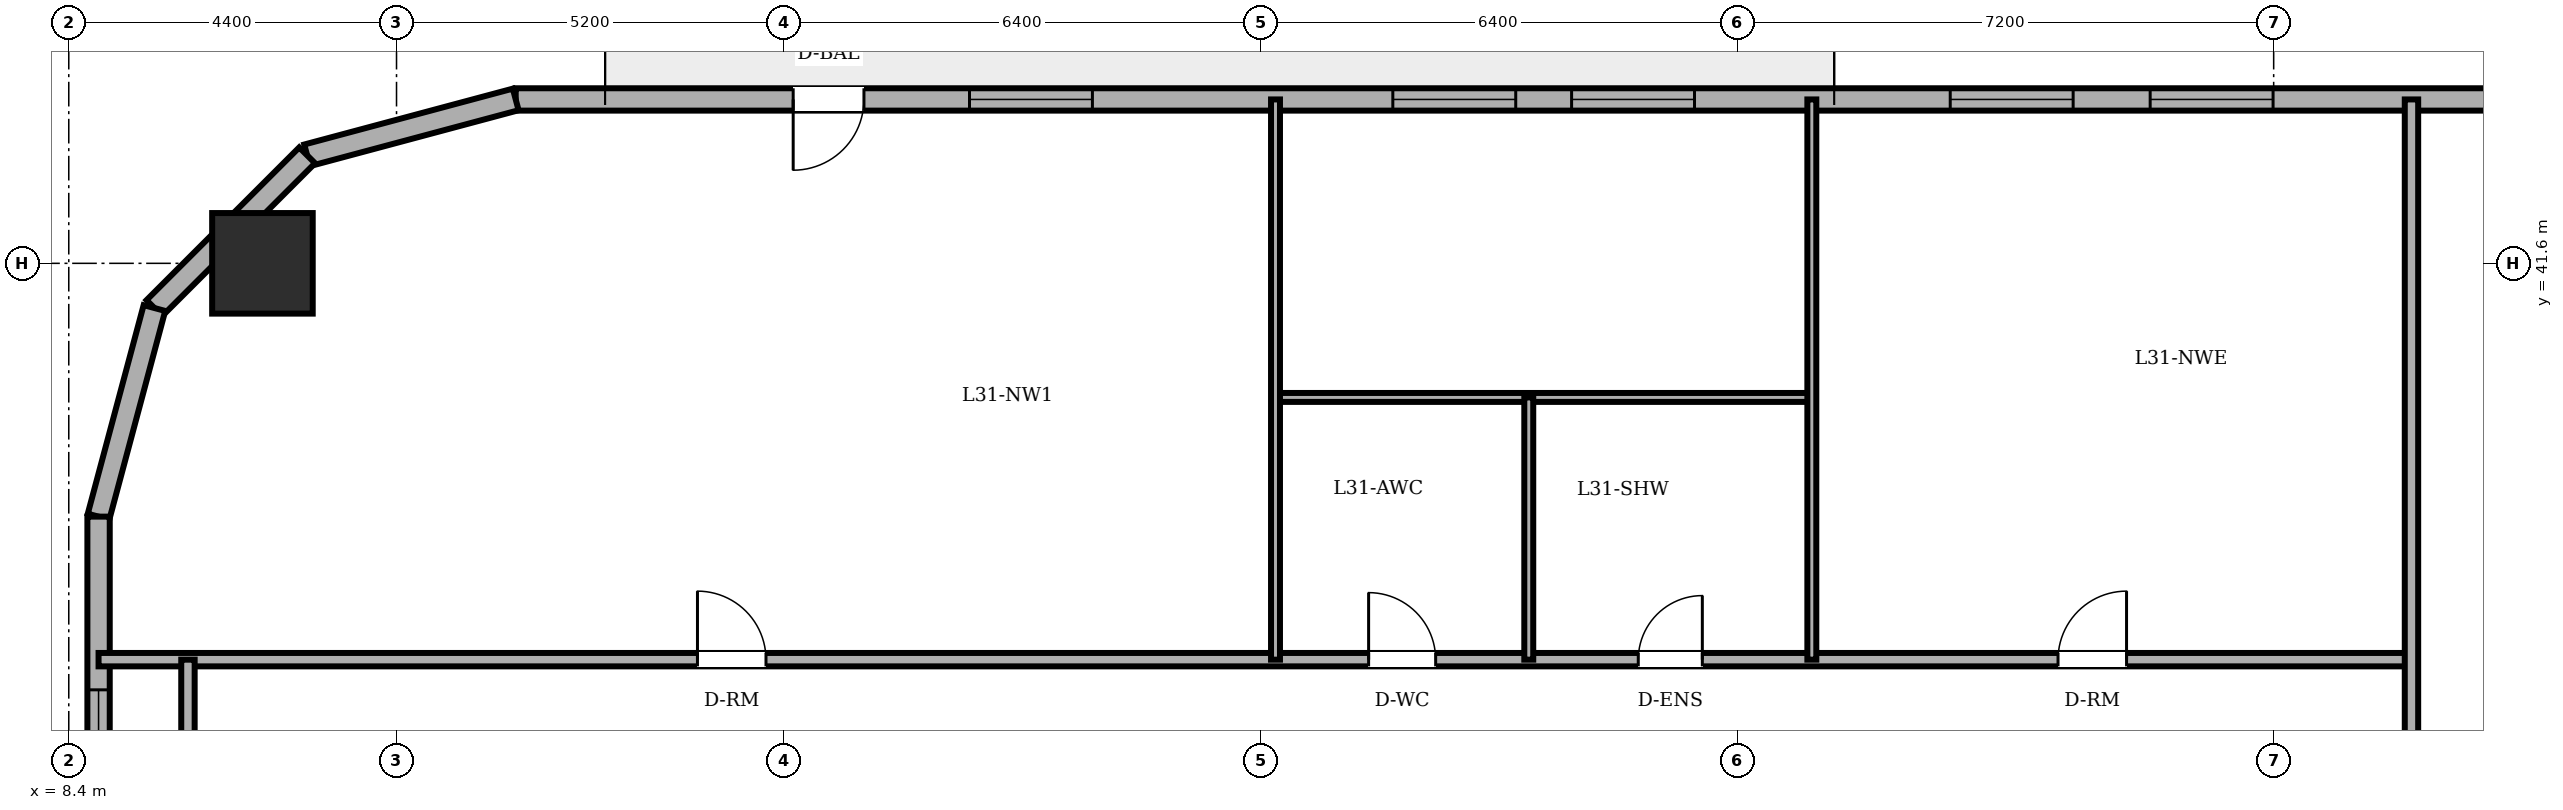
"""IFC4 building model, lengths in metres.
Left out: names, types, materials, properties, quantities, classifications, styles, units other than length and angle.
Written with IfcOpenShell. Run it as: python <this file> out.ifc"""

import sys

from ifc_helpers import new_model, si_unit, direction, frame, frame_2d, origin, origin_2d, place, context, subcontext, project, spatial, rectangle, circle, extrude, element, fill, save


model = new_model("IFC4")
c1 = context("Model", 3, precision=1e-05, world=origin(), true_north=direction((0.0, 1.0)))
c2 = subcontext(c1, "Body", "Model", "MODEL_VIEW")
j1 = project(units=[si_unit("LENGTHUNIT", "METRE"), si_unit("PLANEANGLEUNIT", "RADIAN")], contexts=[c1])
p1 = place(None, origin())
s1 = spatial("IfcSite", under=j1, at=p1, CompositionType="ELEMENT")
p2 = place(p1, origin())
s2 = spatial("IfcBuilding", under=s1, at=p2, CompositionType="ELEMENT")
p3 = place(p2, frame((0.0, 0.0, 118.7)))
s3 = spatial("IfcBuildingStorey", under=s2, at=p3, CompositionType="ELEMENT", Elevation=118.7)
p4 = place(p3, frame((11.0, 41.6, 0.0), z_axis=(0.0, 0.0, 1.0), x_axis=(1.0, 0.0, 0.0)))
e1 = element("IfcColumn", 1, at=p4, inside=s3, PredefinedType="COLUMN", context=c2, shape_type="SweptSolid", body=[
    extrude(circle(Radius=0.675, at=origin_2d()), origin(), (0.0, 0.0, 1.0), 3.6),
])
p5 = place(p3, frame((44.333, 43.8, 0.0), z_axis=(0.0, 0.0, 1.0), x_axis=(-1.0, 0.0, 0.0)))
e2 = element("IfcWall", 2, at=p5, inside=s3, PredefinedType="SOLIDWALL", context=c2, shape_type="SweptSolid", body=[
    extrude(rectangle(XDim=29.933, YDim=0.3, at=frame_2d((14.967, 0.0))), origin(), (0.0, 0.0, 1.0), 3.4),
])
p6 = place(p5, frame((25.258, 0.0, 0.0)))
e3 = element("IfcOpeningElement", 3, at=p6, cuts=e2, PredefinedType="OPENING", context=c2, shape_type="SweptSolid", body=[
    extrude(rectangle(XDim=0.95, YDim=2.2, at=frame_2d((0.475, 1.1))), frame((0.0, 0.16, 0.0), z_axis=(0.0, -1.0, 0.0), x_axis=(1.0, 0.0, 0.0)), (0.0, 0.0, 1.0), 0.32),
])
p7 = place(p5, frame((1.729, 0.0, 0.85)))
e4 = element("IfcOpeningElement", 4, at=p7, cuts=e2, PredefinedType="OPENING", context=c2, shape_type="SweptSolid", body=[
    extrude(rectangle(XDim=1.65, YDim=1.55, at=frame_2d((0.825, 0.775))), frame((0.0, 0.16, 0.0), z_axis=(0.0, -1.0, 0.0), x_axis=(1.0, 0.0, 0.0)), (0.0, 0.0, 1.0), 0.32),
])
p8 = place(p5, frame((6.341, 0.0, 0.85)))
e5 = element("IfcOpeningElement", 5, at=p8, cuts=e2, PredefinedType="OPENING", context=c2, shape_type="SweptSolid", body=[
    extrude(rectangle(XDim=1.65, YDim=1.55, at=frame_2d((0.825, 0.775))), frame((0.0, 0.16, 0.0), z_axis=(0.0, -1.0, 0.0), x_axis=(1.0, 0.0, 0.0)), (0.0, 0.0, 1.0), 0.32),
])
p9 = place(p5, frame((9.025, 0.0, 0.85)))
e6 = element("IfcOpeningElement", 6, at=p9, cuts=e2, PredefinedType="OPENING", context=c2, shape_type="SweptSolid", body=[
    extrude(rectangle(XDim=1.65, YDim=1.55, at=frame_2d((0.825, 0.775))), frame((0.0, 0.16, 0.0), z_axis=(0.0, -1.0, 0.0), x_axis=(1.0, 0.0, 0.0)), (0.0, 0.0, 1.0), 0.32),
])
p10 = place(p5, frame((14.108, 0.0, 0.85)))
e7 = element("IfcOpeningElement", 7, at=p10, cuts=e2, PredefinedType="OPENING", context=c2, shape_type="SweptSolid", body=[
    extrude(rectangle(XDim=1.65, YDim=1.55, at=frame_2d((0.825, 0.775))), frame((0.0, 0.16, 0.0), z_axis=(0.0, -1.0, 0.0), x_axis=(1.0, 0.0, 0.0)), (0.0, 0.0, 1.0), 0.32),
])
p11 = place(p5, frame((16.508, 0.0, 0.85)))
e8 = element("IfcOpeningElement", 8, at=p11, cuts=e2, PredefinedType="OPENING", context=c2, shape_type="SweptSolid", body=[
    extrude(rectangle(XDim=1.65, YDim=1.55, at=frame_2d((0.825, 0.775))), frame((0.0, 0.16, 0.0), z_axis=(0.0, -1.0, 0.0), x_axis=(1.0, 0.0, 0.0)), (0.0, 0.0, 1.0), 0.32),
])
p12 = place(p5, frame((22.191, 0.0, 0.85)))
e9 = element("IfcOpeningElement", 9, at=p12, cuts=e2, PredefinedType="OPENING", context=c2, shape_type="SweptSolid", body=[
    extrude(rectangle(XDim=1.65, YDim=1.55, at=frame_2d((0.825, 0.775))), frame((0.0, 0.16, 0.0), z_axis=(0.0, -1.0, 0.0), x_axis=(1.0, 0.0, 0.0)), (0.0, 0.0, 1.0), 0.32),
])
p13 = place(p3, frame((14.4, 43.8, 0.0), z_axis=(0.0, 0.0, 1.0), x_axis=(-0.965943540406, -0.258752926066, 0.0)))
e10 = element("IfcWall", 10, at=p13, inside=s3, PredefinedType="SOLIDWALL", context=c2, shape_type="SweptSolid", body=[
    extrude(rectangle(XDim=2.898, YDim=0.3, at=frame_2d((1.449, 0.0))), origin(), (0.0, 0.0, 1.0), 3.4),
])
p14 = place(p3, frame((11.6, 43.05, 0.0), z_axis=(0.0, 0.0, 1.0), x_axis=(-0.707106781187, -0.707106781187, 0.0)))
e11 = element("IfcWall", 11, at=p14, inside=s3, PredefinedType="SOLIDWALL", context=c2, shape_type="SweptSolid", body=[
    extrude(rectangle(XDim=2.899, YDim=0.3, at=frame_2d((1.45, 0.0))), origin(), (0.0, 0.0, 1.0), 3.4),
])
p15 = place(p3, frame((9.55, 41.0, 0.0), z_axis=(0.0, 0.0, 1.0), x_axis=(-0.258731875344, -0.96594917914, 0.0)))
e12 = element("IfcWall", 12, at=p15, inside=s3, PredefinedType="SOLIDWALL", context=c2, shape_type="SweptSolid", body=[
    extrude(rectangle(XDim=2.899, YDim=0.3, at=frame_2d((1.449, 0.0))), origin(), (0.0, 0.0, 1.0), 3.4),
])
p16 = place(p3, frame((8.8, 38.2, 0.0), z_axis=(0.0, 0.0, 1.0), x_axis=(0.0, -1.0, 0.0)))
e13 = element("IfcWall", 13, at=p16, inside=s3, PredefinedType="SOLIDWALL", context=c2, shape_type="SweptSolid", body=[
    extrude(rectangle(XDim=28.4, YDim=0.3, at=frame_2d((14.2, 0.0))), origin(), (0.0, 0.0, 1.0), 3.4),
])
p17 = place(p16, frame((2.325, 0.0, 0.85)))
e14 = element("IfcOpeningElement", 14, at=p17, cuts=e13, PredefinedType="OPENING", context=c2, shape_type="SweptSolid", body=[
    extrude(rectangle(XDim=1.65, YDim=1.55, at=frame_2d((0.825, 0.775))), frame((0.0, 0.16, 0.0), z_axis=(0.0, -1.0, 0.0), x_axis=(1.0, 0.0, 0.0)), (0.0, 0.0, 1.0), 0.32),
])
p18 = place(p16, frame((6.828, 0.0, 0.85)))
e15 = element("IfcOpeningElement", 15, at=p18, cuts=e13, PredefinedType="OPENING", context=c2, shape_type="SweptSolid", body=[
    extrude(rectangle(XDim=1.65, YDim=1.55, at=frame_2d((0.825, 0.775))), frame((0.0, 0.16, 0.0), z_axis=(0.0, -1.0, 0.0), x_axis=(1.0, 0.0, 0.0)), (0.0, 0.0, 1.0), 0.32),
])
p19 = place(p16, frame((10.102, 0.0, 0.85)))
e16 = element("IfcOpeningElement", 16, at=p19, cuts=e13, PredefinedType="OPENING", context=c2, shape_type="SweptSolid", body=[
    extrude(rectangle(XDim=1.65, YDim=1.55, at=frame_2d((0.825, 0.775))), frame((0.0, 0.16, 0.0), z_axis=(0.0, -1.0, 0.0), x_axis=(1.0, 0.0, 0.0)), (0.0, 0.0, 1.0), 0.32),
])
p20 = place(p16, frame((16.648, 0.0, 0.85)))
e17 = element("IfcOpeningElement", 17, at=p20, cuts=e13, PredefinedType="OPENING", context=c2, shape_type="SweptSolid", body=[
    extrude(rectangle(XDim=1.65, YDim=1.55, at=frame_2d((0.825, 0.775))), frame((0.0, 0.16, 0.0), z_axis=(0.0, -1.0, 0.0), x_axis=(1.0, 0.0, 0.0)), (0.0, 0.0, 1.0), 0.32),
])
p21 = place(p16, frame((19.922, 0.0, 0.85)))
e18 = element("IfcOpeningElement", 18, at=p21, cuts=e13, PredefinedType="OPENING", context=c2, shape_type="SweptSolid", body=[
    extrude(rectangle(XDim=1.65, YDim=1.55, at=frame_2d((0.825, 0.775))), frame((0.0, 0.16, 0.0), z_axis=(0.0, -1.0, 0.0), x_axis=(1.0, 0.0, 0.0)), (0.0, 0.0, 1.0), 0.32),
])
p22 = place(p16, frame((24.425, 0.0, 0.85)))
e19 = element("IfcOpeningElement", 19, at=p22, cuts=e13, PredefinedType="OPENING", context=c2, shape_type="SweptSolid", body=[
    extrude(rectangle(XDim=1.65, YDim=1.55, at=frame_2d((0.825, 0.775))), frame((0.0, 0.16, 0.0), z_axis=(0.0, -1.0, 0.0), x_axis=(1.0, 0.0, 0.0)), (0.0, 0.0, 1.0), 0.32),
])
p23 = place(p3, frame((8.8, 36.28, 0.0), z_axis=(0.0, 0.0, 1.0), x_axis=(1.0, 0.0, 0.0)))
e20 = element("IfcWall", 20, at=p23, inside=s3, PredefinedType="PARTITIONING", context=c2, shape_type="SweptSolid", body=[
    extrude(rectangle(XDim=31.05, YDim=0.18, at=frame_2d((15.525, 0.0))), origin(), (0.0, 0.0, 1.0), 3.4),
])
p24 = place(p23, frame((17.05, 0.0, 0.0)))
e21 = element("IfcOpeningElement", 21, at=p24, cuts=e20, PredefinedType="OPENING", context=c2, shape_type="SweptSolid", body=[
    extrude(rectangle(XDim=0.9, YDim=2.1, at=frame_2d((0.45, 1.05))), frame((0.0, 0.1, 0.0), z_axis=(0.0, -1.0, 0.0), x_axis=(1.0, 0.0, 0.0)), (0.0, 0.0, 1.0), 0.2),
])
p25 = place(p23, frame((20.67, 0.0, 0.0)))
e22 = element("IfcOpeningElement", 22, at=p25, cuts=e20, PredefinedType="OPENING", context=c2, shape_type="SweptSolid", body=[
    extrude(rectangle(XDim=0.86, YDim=2.1, at=frame_2d((0.43, 1.05))), frame((0.0, 0.1, 0.0), z_axis=(0.0, -1.0, 0.0), x_axis=(1.0, 0.0, 0.0)), (0.0, 0.0, 1.0), 0.2),
])
p26 = place(p23, frame((8.04, 0.0, 0.0)))
e23 = element("IfcOpeningElement", 23, at=p26, cuts=e20, PredefinedType="OPENING", context=c2, shape_type="SweptSolid", body=[
    extrude(rectangle(XDim=0.92, YDim=2.1, at=frame_2d((0.46, 1.05))), frame((0.0, 0.1, 0.0), z_axis=(0.0, -1.0, 0.0), x_axis=(1.0, 0.0, 0.0)), (0.0, 0.0, 1.0), 0.2),
])
p27 = place(p23, frame((26.305, 0.0, 0.0)))
e24 = element("IfcOpeningElement", 24, at=p27, cuts=e20, PredefinedType="OPENING", context=c2, shape_type="SweptSolid", body=[
    extrude(rectangle(XDim=0.92, YDim=2.1, at=frame_2d((0.46, 1.05))), frame((0.0, 0.1, 0.0), z_axis=(0.0, -1.0, 0.0), x_axis=(1.0, 0.0, 0.0)), (0.0, 0.0, 1.0), 0.2),
])
p28 = place(p3, frame((24.6, 39.8, 0.0), z_axis=(0.0, 0.0, 1.0), x_axis=(1.0, 0.0, 0.0)))
e25 = element("IfcWall", 25, at=p28, inside=s3, PredefinedType="PARTITIONING", context=c2, shape_type="SweptSolid", body=[
    extrude(rectangle(XDim=7.2, YDim=0.12, at=frame_2d((3.6, 0.0))), origin(), (0.0, 0.0, 1.0), 3.4),
])
p29 = place(p3, frame((10.0, 33.82, 0.0), z_axis=(0.0, 0.0, 1.0), x_axis=(0.0, 1.0, 0.0)))
e26 = element("IfcWall", 26, at=p29, inside=s3, PredefinedType="PARTITIONING", context=c2, shape_type="SweptSolid", body=[
    extrude(rectangle(XDim=2.46, YDim=0.18, at=frame_2d((1.23, 0.0))), origin(), (0.0, 0.0, 1.0), 3.4),
])
p30 = place(p3, frame((24.6, 36.28, 0.0), z_axis=(0.0, 0.0, 1.0), x_axis=(0.0, 1.0, 0.0)))
e27 = element("IfcWall", 27, at=p30, inside=s3, PredefinedType="PARTITIONING", context=c2, shape_type="SweptSolid", body=[
    extrude(rectangle(XDim=7.52, YDim=0.12, at=frame_2d((3.76, 0.0))), origin(), (0.0, 0.0, 1.0), 3.4),
])
p31 = place(p3, frame((28.0, 36.28, 0.0), z_axis=(0.0, 0.0, 1.0), x_axis=(0.0, 1.0, 0.0)))
e28 = element("IfcWall", 28, at=p31, inside=s3, PredefinedType="PARTITIONING", context=c2, shape_type="SweptSolid", body=[
    extrude(rectangle(XDim=3.52, YDim=0.12, at=frame_2d((1.76, 0.0))), origin(), (0.0, 0.0, 1.0), 3.4),
])
p32 = place(p3, frame((31.8, 36.28, 0.0), z_axis=(0.0, 0.0, 1.0), x_axis=(0.0, 1.0, 0.0)))
e29 = element("IfcWall", 29, at=p32, inside=s3, PredefinedType="PARTITIONING", context=c2, shape_type="SweptSolid", body=[
    extrude(rectangle(XDim=7.52, YDim=0.12, at=frame_2d((3.76, 0.0))), origin(), (0.0, 0.0, 1.0), 3.4),
])
p33 = place(p3, frame((39.85, 25.18, 0.0), z_axis=(0.0, 0.0, 1.0), x_axis=(0.0, 1.0, 0.0)))
e30 = element("IfcWall", 30, at=p33, inside=s3, PredefinedType="PARTITIONING", context=c2, shape_type="SweptSolid", body=[
    extrude(rectangle(XDim=18.62, YDim=0.18, at=frame_2d((9.31, 0.0))), origin(), (0.0, 0.0, 1.0), 3.4),
])
p34 = place(p33, frame((5.35, 0.0, 0.0)))
e31 = element("IfcOpeningElement", 31, at=p34, cuts=e30, PredefinedType="OPENING", context=c2, shape_type="SweptSolid", body=[
    extrude(rectangle(XDim=0.92, YDim=2.1, at=frame_2d((0.46, 1.05))), frame((0.0, 0.1, 0.0), z_axis=(0.0, -1.0, 0.0), x_axis=(1.0, 0.0, 0.0)), (0.0, 0.0, 1.0), 0.2),
])
p35 = place(p6, origin())
e32 = element("IfcDoor", 32, at=p35, inside=s3, OperationType="SINGLE_SWING_RIGHT", PredefinedType="DOOR", context=c2, shape_type="SweptSolid", body=[
    extrude(rectangle(XDim=0.95, YDim=2.2, at=frame_2d((0.475, 1.1))), frame((0.0, 0.025, 0.0), z_axis=(0.0, -1.0, 0.0), x_axis=(1.0, 0.0, 0.0)), (0.0, 0.0, 1.0), 0.05),
])
fill(e3, e32)
p36 = place(p8, origin())
e33 = element("IfcWindow", 33, at=p36, inside=s3, PartitioningType="DOUBLE_PANEL_VERTICAL", PredefinedType="WINDOW", context=c2, shape_type="SweptSolid", body=[
    extrude(rectangle(XDim=1.65, YDim=1.55, at=frame_2d((0.825, 0.775))), frame((0.0, 0.03, 0.0), z_axis=(0.0, -1.0, 0.0), x_axis=(1.0, 0.0, 0.0)), (0.0, 0.0, 1.0), 0.06),
])
fill(e5, e33)
p37 = place(p9, origin())
e34 = element("IfcWindow", 34, at=p37, inside=s3, PartitioningType="DOUBLE_PANEL_VERTICAL", PredefinedType="WINDOW", context=c2, shape_type="SweptSolid", body=[
    extrude(rectangle(XDim=1.65, YDim=1.55, at=frame_2d((0.825, 0.775))), frame((0.0, 0.03, 0.0), z_axis=(0.0, -1.0, 0.0), x_axis=(1.0, 0.0, 0.0)), (0.0, 0.0, 1.0), 0.06),
])
fill(e6, e34)
p38 = place(p10, origin())
e35 = element("IfcWindow", 35, at=p38, inside=s3, PartitioningType="DOUBLE_PANEL_VERTICAL", PredefinedType="WINDOW", context=c2, shape_type="SweptSolid", body=[
    extrude(rectangle(XDim=1.65, YDim=1.55, at=frame_2d((0.825, 0.775))), frame((0.0, 0.03, 0.0), z_axis=(0.0, -1.0, 0.0), x_axis=(1.0, 0.0, 0.0)), (0.0, 0.0, 1.0), 0.06),
])
fill(e7, e35)
p39 = place(p11, origin())
e36 = element("IfcWindow", 36, at=p39, inside=s3, PartitioningType="DOUBLE_PANEL_VERTICAL", PredefinedType="WINDOW", context=c2, shape_type="SweptSolid", body=[
    extrude(rectangle(XDim=1.65, YDim=1.55, at=frame_2d((0.825, 0.775))), frame((0.0, 0.03, 0.0), z_axis=(0.0, -1.0, 0.0), x_axis=(1.0, 0.0, 0.0)), (0.0, 0.0, 1.0), 0.06),
])
fill(e8, e36)
p40 = place(p12, origin())
e37 = element("IfcWindow", 37, at=p40, inside=s3, PartitioningType="DOUBLE_PANEL_VERTICAL", PredefinedType="WINDOW", context=c2, shape_type="SweptSolid", body=[
    extrude(rectangle(XDim=1.65, YDim=1.55, at=frame_2d((0.825, 0.775))), frame((0.0, 0.03, 0.0), z_axis=(0.0, -1.0, 0.0), x_axis=(1.0, 0.0, 0.0)), (0.0, 0.0, 1.0), 0.06),
])
fill(e9, e37)
p41 = place(p17, origin())
e38 = element("IfcWindow", 38, at=p41, inside=s3, PartitioningType="DOUBLE_PANEL_VERTICAL", PredefinedType="WINDOW", context=c2, shape_type="SweptSolid", body=[
    extrude(rectangle(XDim=1.65, YDim=1.55, at=frame_2d((0.825, 0.775))), frame((0.0, 0.03, 0.0), z_axis=(0.0, -1.0, 0.0), x_axis=(1.0, 0.0, 0.0)), (0.0, 0.0, 1.0), 0.06),
])
fill(e14, e38)
p42 = place(p24, origin())
e39 = element("IfcDoor", 39, at=p42, inside=s3, OperationType="SINGLE_SWING_LEFT", PredefinedType="DOOR", context=c2, shape_type="SweptSolid", body=[
    extrude(rectangle(XDim=0.9, YDim=2.1, at=frame_2d((0.45, 1.05))), frame((0.0, 0.025, 0.0), z_axis=(0.0, -1.0, 0.0), x_axis=(1.0, 0.0, 0.0)), (0.0, 0.0, 1.0), 0.05),
])
fill(e21, e39)
p43 = place(p25, origin())
e40 = element("IfcDoor", 40, at=p43, inside=s3, OperationType="SINGLE_SWING_RIGHT", PredefinedType="DOOR", context=c2, shape_type="SweptSolid", body=[
    extrude(rectangle(XDim=0.86, YDim=2.1, at=frame_2d((0.43, 1.05))), frame((0.0, 0.025, 0.0), z_axis=(0.0, -1.0, 0.0), x_axis=(1.0, 0.0, 0.0)), (0.0, 0.0, 1.0), 0.05),
])
fill(e22, e40)
p44 = place(p26, origin())
e41 = element("IfcDoor", 41, at=p44, inside=s3, OperationType="SINGLE_SWING_LEFT", PredefinedType="DOOR", context=c2, shape_type="SweptSolid", body=[
    extrude(rectangle(XDim=0.92, YDim=2.1, at=frame_2d((0.46, 1.05))), frame((0.0, 0.025, 0.0), z_axis=(0.0, -1.0, 0.0), x_axis=(1.0, 0.0, 0.0)), (0.0, 0.0, 1.0), 0.05),
])
fill(e23, e41)
p45 = place(p27, origin())
e42 = element("IfcDoor", 42, at=p45, inside=s3, OperationType="SINGLE_SWING_RIGHT", PredefinedType="DOOR", context=c2, shape_type="SweptSolid", body=[
    extrude(rectangle(XDim=0.92, YDim=2.1, at=frame_2d((0.46, 1.05))), frame((0.0, 0.025, 0.0), z_axis=(0.0, -1.0, 0.0), x_axis=(1.0, 0.0, 0.0)), (0.0, 0.0, 1.0), 0.05),
])
fill(e24, e42)
save(model, sys.argv[1])
